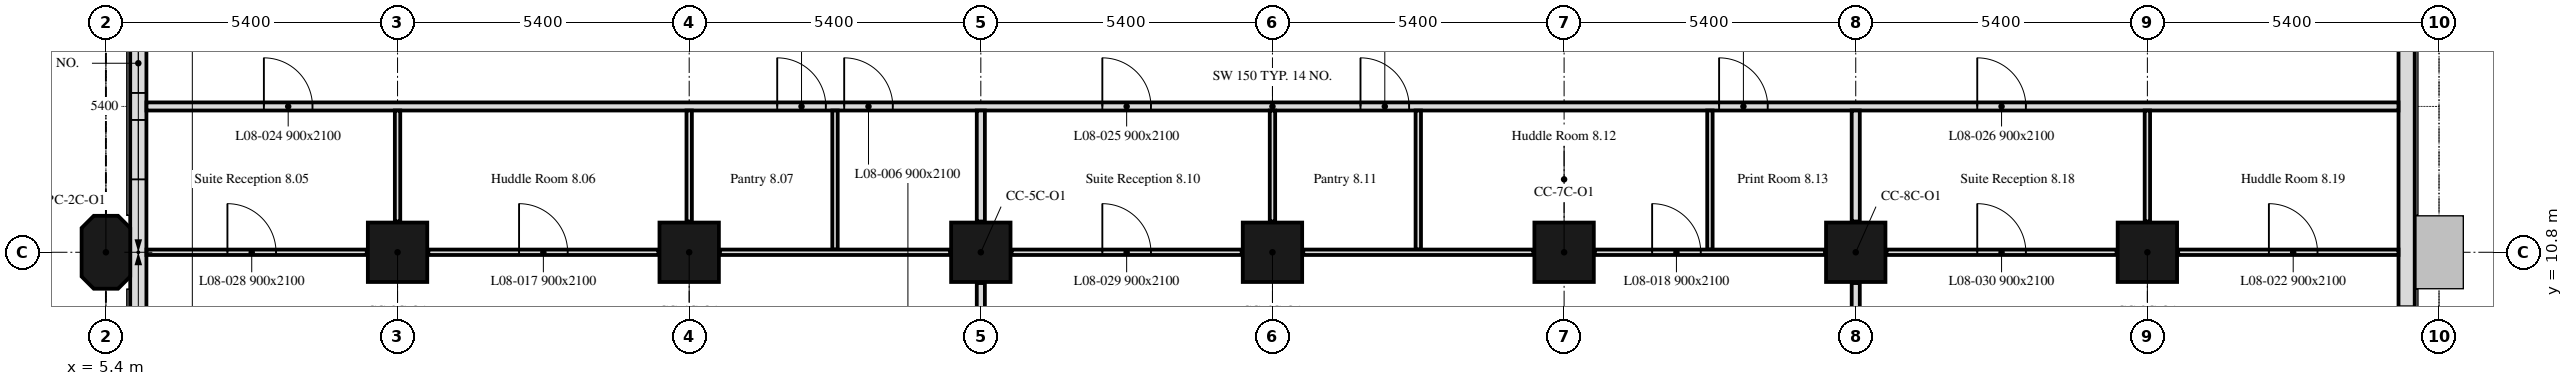
"""IFC4 building model, lengths in metres.
Left out: names, types, materials, properties, quantities, classifications, styles, units other than length and angle.
Written with IfcOpenShell. Run it as: python <this file> out.ifc"""

import sys

from ifc_helpers import new_model, si_unit, direction, frame, frame_2d, origin, origin_2d, place, context, subcontext, project, spatial, polyline, rectangle, outline, extrude, element, fill, save


model = new_model("IFC4")
c1 = context("Model", 3, precision=1e-05, world=origin(), true_north=direction((0.0, 1.0)))
c2 = subcontext(c1, "Body", "Model", "MODEL_VIEW")
j1 = project(units=[si_unit("LENGTHUNIT", "METRE"), si_unit("PLANEANGLEUNIT", "RADIAN")], contexts=[c1])
p1 = place(None, origin())
s1 = spatial("IfcSite", under=j1, at=p1, CompositionType="ELEMENT")
p2 = place(p1, origin())
s2 = spatial("IfcBuilding", under=s1, at=p2, CompositionType="ELEMENT")
p3 = place(p2, frame((0.0, 0.0, 41.2)))
s3 = spatial("IfcBuildingStorey", under=s2, at=p3, CompositionType="ELEMENT", Elevation=41.2)
p4 = place(p3, frame((5.4, 10.8, 0.0), z_axis=(0.0, 0.0, 1.0), x_axis=(0.0, 1.0, 0.0)))
e1 = element("IfcColumn", 1, at=p4, inside=s3, PredefinedType="COLUMN", context=c2, shape_type="SweptSolid", body=[
    extrude(outline(polyline([(-0.45, -0.45), (0.45, -0.45), (0.675, -0.225), (0.675, 0.225), (0.45, 0.45), (-0.45, 0.45), (-0.675, 0.225), (-0.675, -0.225), (-0.45, -0.45)])), origin(), (0.0, 0.0, 1.0), 3.5),
])
for number, where, z_axis, x_axis in (
    (2, (10.8, 10.8, 0.0), (0.0, 0.0, 1.0), (1.0, 0.0, 0.0)),
    (3, (16.2, 10.8, 0.0), (0.0, 0.0, 1.0), (1.0, 0.0, 0.0)),
    (4, (21.6, 10.8, 0.0), (0.0, 0.0, 1.0), (1.0, 0.0, 0.0)),
    (5, (27.0, 10.8, 0.0), (0.0, 0.0, 1.0), (1.0, 0.0, 0.0)),
    (6, (32.4, 10.8, 0.0), (0.0, 0.0, 1.0), (1.0, 0.0, 0.0)),
    (7, (37.8, 10.8, 0.0), (0.0, 0.0, 1.0), (1.0, 0.0, 0.0)),
    (8, (43.2, 10.8, 0.0), (0.0, 0.0, 1.0), (1.0, 0.0, 0.0)),
):
    element("IfcColumn", number, at=place(p3, frame(where, z_axis=z_axis, x_axis=x_axis)), inside=s3, PredefinedType="COLUMN", context=c2, shape_type="SweptSolid", body=[
        extrude(rectangle(XDim=1.1, YDim=1.1, at=origin_2d()), origin(), (0.0, 0.0, 1.0), 3.5),
    ])
p5 = place(p3, frame((48.0, 5.586, 0.0), z_axis=(0.0, 0.0, 1.0), x_axis=(0.0, 1.0, 0.0)))
e9 = element("IfcWall", 9, at=p5, inside=s3, PredefinedType="SOLIDWALL", context=c2, shape_type="SweptSolid", body=[
    extrude(rectangle(XDim=32.027, YDim=0.3, at=frame_2d((16.014, 0.0))), origin(), (0.0, 0.0, 1.0), 3.5),
])
p6 = place(p5, frame((0.814, 0.0, 0.9)))
e10 = element("IfcOpeningElement", 10, at=p6, cuts=e9, PredefinedType="OPENING", context=c2, shape_type="SweptSolid", body=[
    extrude(rectangle(XDim=3.4, YDim=1.7, at=frame_2d((1.7, 0.85))), frame((0.0, 0.16, 0.0), z_axis=(0.0, -1.0, 0.0), x_axis=(1.0, 0.0, 0.0)), (0.0, 0.0, 1.0), 0.32),
])
p7 = place(p5, frame((11.614, 0.0, 0.9)))
e11 = element("IfcOpeningElement", 11, at=p7, cuts=e9, PredefinedType="OPENING", context=c2, shape_type="SweptSolid", body=[
    extrude(rectangle(XDim=3.4, YDim=1.7, at=frame_2d((1.7, 0.85))), frame((0.0, 0.16, 0.0), z_axis=(0.0, -1.0, 0.0), x_axis=(1.0, 0.0, 0.0)), (0.0, 0.0, 1.0), 0.32),
])
p8 = place(p5, frame((22.414, 0.0, 0.9)))
e12 = element("IfcOpeningElement", 12, at=p8, cuts=e9, PredefinedType="OPENING", context=c2, shape_type="SweptSolid", body=[
    extrude(rectangle(XDim=3.4, YDim=1.7, at=frame_2d((1.7, 0.85))), frame((0.0, 0.16, 0.0), z_axis=(0.0, -1.0, 0.0), x_axis=(1.0, 0.0, 0.0)), (0.0, 0.0, 1.0), 0.32),
])
p9 = place(p3, frame((6.0, 16.2, 0.0), z_axis=(0.0, 0.0, 1.0), x_axis=(0.0, -1.0, 0.0)))
e13 = element("IfcWall", 13, at=p9, inside=s3, PredefinedType="SOLIDWALL", context=c2, shape_type="SweptSolid", body=[
    extrude(rectangle(XDim=10.614, YDim=0.3, at=frame_2d((5.307, 0.0))), origin(), (0.0, 0.0, 1.0), 3.5),
])
p10 = place(p9, frame((1.35, 0.0, 0.9)))
e14 = element("IfcOpeningElement", 14, at=p10, cuts=e13, PredefinedType="OPENING", context=c2, shape_type="SweptSolid", body=[
    extrude(rectangle(XDim=1.1, YDim=1.7, at=frame_2d((0.55, 0.85))), frame((0.0, 0.16, 0.0), z_axis=(0.0, -1.0, 0.0), x_axis=(1.0, 0.0, 0.0)), (0.0, 0.0, 1.0), 0.32),
])
p11 = place(p9, frame((2.95, 0.0, 0.9)))
e15 = element("IfcOpeningElement", 15, at=p11, cuts=e13, PredefinedType="OPENING", context=c2, shape_type="SweptSolid", body=[
    extrude(rectangle(XDim=1.1, YDim=1.7, at=frame_2d((0.55, 0.85))), frame((0.0, 0.16, 0.0), z_axis=(0.0, -1.0, 0.0), x_axis=(1.0, 0.0, 0.0)), (0.0, 0.0, 1.0), 0.32),
])
p12 = place(p3, frame((6.151, 13.5, 0.0), z_axis=(0.0, 0.0, 1.0), x_axis=(1.0, 0.0, 0.0)))
e16 = element("IfcWall", 16, at=p12, inside=s3, PredefinedType="PARTITIONING", context=c2, shape_type="SweptSolid", body=[
    extrude(rectangle(XDim=41.698, YDim=0.15, at=frame_2d((20.849, 0.0))), origin(), (0.0, 0.0, 1.0), 2.75),
])
p13 = place(p12, frame((11.679, 0.0, 0.0)))
e17 = element("IfcOpeningElement", 17, at=p13, cuts=e16, PredefinedType="OPENING", context=c2, shape_type="SweptSolid", body=[
    extrude(rectangle(XDim=0.9, YDim=2.1, at=frame_2d((0.45, 1.05))), frame((0.0, 0.075, 0.0), z_axis=(0.0, -1.0, 0.0), x_axis=(1.0, 0.0, 0.0)), (0.0, 0.0, 1.0), 0.15),
])
p14 = place(p12, frame((12.919, 0.0, 0.0)))
e18 = element("IfcOpeningElement", 18, at=p14, cuts=e16, PredefinedType="OPENING", context=c2, shape_type="SweptSolid", body=[
    extrude(rectangle(XDim=0.9, YDim=2.1, at=frame_2d((0.45, 1.05))), frame((0.0, 0.075, 0.0), z_axis=(0.0, -1.0, 0.0), x_axis=(1.0, 0.0, 0.0)), (0.0, 0.0, 1.0), 0.15),
])
p15 = place(p12, frame((22.479, 0.0, 0.0)))
e19 = element("IfcOpeningElement", 19, at=p15, cuts=e16, PredefinedType="OPENING", context=c2, shape_type="SweptSolid", body=[
    extrude(rectangle(XDim=0.9, YDim=2.1, at=frame_2d((0.45, 1.05))), frame((0.0, 0.075, 0.0), z_axis=(0.0, -1.0, 0.0), x_axis=(1.0, 0.0, 0.0)), (0.0, 0.0, 1.0), 0.15),
])
p16 = place(p12, frame((29.119, 0.0, 0.0)))
e20 = element("IfcOpeningElement", 20, at=p16, cuts=e16, PredefinedType="OPENING", context=c2, shape_type="SweptSolid", body=[
    extrude(rectangle(XDim=0.9, YDim=2.1, at=frame_2d((0.45, 1.05))), frame((0.0, 0.075, 0.0), z_axis=(0.0, -1.0, 0.0), x_axis=(1.0, 0.0, 0.0)), (0.0, 0.0, 1.0), 0.15),
])
p17 = place(p12, frame((2.174, 0.0, 0.0)))
e21 = element("IfcOpeningElement", 21, at=p17, cuts=e16, PredefinedType="OPENING", context=c2, shape_type="SweptSolid", body=[
    extrude(rectangle(XDim=0.9, YDim=2.1, at=frame_2d((0.45, 1.05))), frame((0.0, 0.075, 0.0), z_axis=(0.0, -1.0, 0.0), x_axis=(1.0, 0.0, 0.0)), (0.0, 0.0, 1.0), 0.15),
])
p18 = place(p12, frame((17.699, 0.0, 0.0)))
e22 = element("IfcOpeningElement", 22, at=p18, cuts=e16, PredefinedType="OPENING", context=c2, shape_type="SweptSolid", body=[
    extrude(rectangle(XDim=0.9, YDim=2.1, at=frame_2d((0.45, 1.05))), frame((0.0, 0.075, 0.0), z_axis=(0.0, -1.0, 0.0), x_axis=(1.0, 0.0, 0.0)), (0.0, 0.0, 1.0), 0.15),
])
p19 = place(p12, frame((33.899, 0.0, 0.0)))
e23 = element("IfcOpeningElement", 23, at=p19, cuts=e16, PredefinedType="OPENING", context=c2, shape_type="SweptSolid", body=[
    extrude(rectangle(XDim=0.9, YDim=2.1, at=frame_2d((0.45, 1.05))), frame((0.0, 0.075, 0.0), z_axis=(0.0, -1.0, 0.0), x_axis=(1.0, 0.0, 0.0)), (0.0, 0.0, 1.0), 0.15),
])
p20 = place(p3, frame((6.151, 10.8, 0.0), z_axis=(0.0, 0.0, 1.0), x_axis=(1.0, 0.0, 0.0)))
e24 = element("IfcWall", 24, at=p20, inside=s3, PredefinedType="PARTITIONING", context=c2, shape_type="SweptSolid", body=[
    extrude(rectangle(XDim=4.079, YDim=0.1, at=frame_2d((2.04, 0.0))), origin(), (0.0, 0.0, 1.0), 3.5),
])
p21 = place(p20, frame((1.499, 0.0, 0.0)))
e25 = element("IfcOpeningElement", 25, at=p21, cuts=e24, PredefinedType="OPENING", context=c2, shape_type="SweptSolid", body=[
    extrude(rectangle(XDim=0.9, YDim=2.1, at=frame_2d((0.45, 1.05))), frame((0.0, 0.05, 0.0), z_axis=(0.0, -1.0, 0.0), x_axis=(1.0, 0.0, 0.0)), (0.0, 0.0, 1.0), 0.1),
])
p22 = place(p3, frame((10.8, 11.37, 0.0), z_axis=(0.0, 0.0, 1.0), x_axis=(0.0, 1.0, 0.0)))
e26 = element("IfcWall", 26, at=p22, inside=s3, PredefinedType="PARTITIONING", context=c2, shape_type="SweptSolid", body=[
    extrude(rectangle(XDim=2.055, YDim=0.1, at=frame_2d((1.027, 0.0))), origin(), (0.0, 0.0, 1.0), 3.5),
])
p23 = place(p3, frame((11.37, 10.8, 0.0), z_axis=(0.0, 0.0, 1.0), x_axis=(1.0, 0.0, 0.0)))
e27 = element("IfcWall", 27, at=p23, inside=s3, PredefinedType="PARTITIONING", context=c2, shape_type="SweptSolid", body=[
    extrude(rectangle(XDim=4.26, YDim=0.1, at=frame_2d((2.13, 0.0))), origin(), (0.0, 0.0, 1.0), 3.5),
])
p24 = place(p23, frame((1.68, 0.0, 0.0)))
e28 = element("IfcOpeningElement", 28, at=p24, cuts=e27, PredefinedType="OPENING", context=c2, shape_type="SweptSolid", body=[
    extrude(rectangle(XDim=0.9, YDim=2.1, at=frame_2d((0.45, 1.05))), frame((0.0, 0.05, 0.0), z_axis=(0.0, -1.0, 0.0), x_axis=(1.0, 0.0, 0.0)), (0.0, 0.0, 1.0), 0.1),
])
p25 = place(p3, frame((16.2, 11.37, 0.0), z_axis=(0.0, 0.0, 1.0), x_axis=(0.0, 1.0, 0.0)))
e29 = element("IfcWall", 29, at=p25, inside=s3, PredefinedType="PARTITIONING", context=c2, shape_type="SweptSolid", body=[
    extrude(rectangle(XDim=2.055, YDim=0.1, at=frame_2d((1.027, 0.0))), origin(), (0.0, 0.0, 1.0), 2.75),
])
p26 = place(p3, frame((18.9, 10.85, 0.0), z_axis=(0.0, 0.0, 1.0), x_axis=(0.0, 1.0, 0.0)))
e30 = element("IfcWall", 30, at=p26, inside=s3, PredefinedType="PARTITIONING", context=c2, shape_type="SweptSolid", body=[
    extrude(rectangle(XDim=2.575, YDim=0.1, at=frame_2d((1.288, 0.0))), origin(), (0.0, 0.0, 1.0), 3.5),
])
p27 = place(p3, frame((16.77, 10.8, 0.0), z_axis=(0.0, 0.0, 1.0), x_axis=(1.0, 0.0, 0.0)))
e31 = element("IfcWall", 31, at=p27, inside=s3, PredefinedType="PARTITIONING", context=c2, shape_type="SweptSolid", body=[
    extrude(rectangle(XDim=4.26, YDim=0.1, at=frame_2d((2.13, 0.0))), origin(), (0.0, 0.0, 1.0), 3.5),
])
p28 = place(p3, frame((21.6, 11.37, 0.0), z_axis=(0.0, 0.0, 1.0), x_axis=(0.0, 1.0, 0.0)))
e32 = element("IfcWall", 32, at=p28, inside=s3, PredefinedType="PARTITIONING", context=c2, shape_type="SweptSolid", body=[
    extrude(rectangle(XDim=2.055, YDim=0.15, at=frame_2d((1.027, 0.0))), origin(), (0.0, 0.0, 1.0), 2.75),
])
p29 = place(p3, frame((21.6, 5.97, 0.0), z_axis=(0.0, 0.0, 1.0), x_axis=(0.0, 1.0, 0.0)))
e33 = element("IfcWall", 33, at=p29, inside=s3, PredefinedType="PARTITIONING", context=c2, shape_type="SweptSolid", body=[
    extrude(rectangle(XDim=4.26, YDim=0.15, at=frame_2d((2.13, 0.0))), origin(), (0.0, 0.0, 1.0), 2.75),
])
p30 = place(p3, frame((22.17, 10.8, 0.0), z_axis=(0.0, 0.0, 1.0), x_axis=(1.0, 0.0, 0.0)))
e34 = element("IfcWall", 34, at=p30, inside=s3, PredefinedType="PARTITIONING", context=c2, shape_type="SweptSolid", body=[
    extrude(rectangle(XDim=4.26, YDim=0.1, at=frame_2d((2.13, 0.0))), origin(), (0.0, 0.0, 1.0), 3.5),
])
p31 = place(p30, frame((1.68, 0.0, 0.0)))
e35 = element("IfcOpeningElement", 35, at=p31, cuts=e34, PredefinedType="OPENING", context=c2, shape_type="SweptSolid", body=[
    extrude(rectangle(XDim=0.9, YDim=2.1, at=frame_2d((0.45, 1.05))), frame((0.0, 0.05, 0.0), z_axis=(0.0, -1.0, 0.0), x_axis=(1.0, 0.0, 0.0)), (0.0, 0.0, 1.0), 0.1),
])
p32 = place(p3, frame((27.0, 11.37, 0.0), z_axis=(0.0, 0.0, 1.0), x_axis=(0.0, 1.0, 0.0)))
e36 = element("IfcWall", 36, at=p32, inside=s3, PredefinedType="PARTITIONING", context=c2, shape_type="SweptSolid", body=[
    extrude(rectangle(XDim=2.055, YDim=0.1, at=frame_2d((1.027, 0.0))), origin(), (0.0, 0.0, 1.0), 2.75),
])
p33 = place(p3, frame((29.7, 10.85, 0.0), z_axis=(0.0, 0.0, 1.0), x_axis=(0.0, 1.0, 0.0)))
e37 = element("IfcWall", 37, at=p33, inside=s3, PredefinedType="PARTITIONING", context=c2, shape_type="SweptSolid", body=[
    extrude(rectangle(XDim=2.575, YDim=0.1, at=frame_2d((1.288, 0.0))), origin(), (0.0, 0.0, 1.0), 3.5),
])
p34 = place(p3, frame((27.57, 10.8, 0.0), z_axis=(0.0, 0.0, 1.0), x_axis=(1.0, 0.0, 0.0)))
e38 = element("IfcWall", 38, at=p34, inside=s3, PredefinedType="PARTITIONING", context=c2, shape_type="SweptSolid", body=[
    extrude(rectangle(XDim=4.26, YDim=0.1, at=frame_2d((2.13, 0.0))), origin(), (0.0, 0.0, 1.0), 3.5),
])
p35 = place(p3, frame((35.1, 10.85, 0.0), z_axis=(0.0, 0.0, 1.0), x_axis=(0.0, 1.0, 0.0)))
e39 = element("IfcWall", 39, at=p35, inside=s3, PredefinedType="PARTITIONING", context=c2, shape_type="SweptSolid", body=[
    extrude(rectangle(XDim=2.575, YDim=0.1, at=frame_2d((1.288, 0.0))), origin(), (0.0, 0.0, 1.0), 3.5),
])
p36 = place(p3, frame((32.97, 10.8, 0.0), z_axis=(0.0, 0.0, 1.0), x_axis=(1.0, 0.0, 0.0)))
e40 = element("IfcWall", 40, at=p36, inside=s3, PredefinedType="PARTITIONING", context=c2, shape_type="SweptSolid", body=[
    extrude(rectangle(XDim=4.26, YDim=0.1, at=frame_2d((2.13, 0.0))), origin(), (0.0, 0.0, 1.0), 2.75),
])
p37 = place(p36, frame((1.06, 0.0, 0.0)))
e41 = element("IfcOpeningElement", 41, at=p37, cuts=e40, PredefinedType="OPENING", context=c2, shape_type="SweptSolid", body=[
    extrude(rectangle(XDim=0.9, YDim=2.1, at=frame_2d((0.45, 1.05))), frame((0.0, 0.05, 0.0), z_axis=(0.0, -1.0, 0.0), x_axis=(1.0, 0.0, 0.0)), (0.0, 0.0, 1.0), 0.1),
])
p38 = place(p3, frame((37.8, 11.37, 0.0), z_axis=(0.0, 0.0, 1.0), x_axis=(0.0, 1.0, 0.0)))
e42 = element("IfcWall", 42, at=p38, inside=s3, PredefinedType="PARTITIONING", context=c2, shape_type="SweptSolid", body=[
    extrude(rectangle(XDim=2.055, YDim=0.15, at=frame_2d((1.027, 0.0))), origin(), (0.0, 0.0, 1.0), 2.75),
])
p39 = place(p3, frame((37.8, 5.97, 0.0), z_axis=(0.0, 0.0, 1.0), x_axis=(0.0, 1.0, 0.0)))
e43 = element("IfcWall", 43, at=p39, inside=s3, PredefinedType="PARTITIONING", context=c2, shape_type="SweptSolid", body=[
    extrude(rectangle(XDim=4.26, YDim=0.15, at=frame_2d((2.13, 0.0))), origin(), (0.0, 0.0, 1.0), 2.75),
])
p40 = place(p3, frame((38.37, 10.8, 0.0), z_axis=(0.0, 0.0, 1.0), x_axis=(1.0, 0.0, 0.0)))
e44 = element("IfcWall", 44, at=p40, inside=s3, PredefinedType="PARTITIONING", context=c2, shape_type="SweptSolid", body=[
    extrude(rectangle(XDim=4.26, YDim=0.1, at=frame_2d((2.13, 0.0))), origin(), (0.0, 0.0, 1.0), 2.75),
])
p41 = place(p40, frame((1.68, 0.0, 0.0)))
e45 = element("IfcOpeningElement", 45, at=p41, cuts=e44, PredefinedType="OPENING", context=c2, shape_type="SweptSolid", body=[
    extrude(rectangle(XDim=0.9, YDim=2.1, at=frame_2d((0.45, 1.05))), frame((0.0, 0.05, 0.0), z_axis=(0.0, -1.0, 0.0), x_axis=(1.0, 0.0, 0.0)), (0.0, 0.0, 1.0), 0.1),
])
p42 = place(p3, frame((43.2, 11.37, 0.0), z_axis=(0.0, 0.0, 1.0), x_axis=(0.0, 1.0, 0.0)))
e46 = element("IfcWall", 46, at=p42, inside=s3, PredefinedType="PARTITIONING", context=c2, shape_type="SweptSolid", body=[
    extrude(rectangle(XDim=2.055, YDim=0.1, at=frame_2d((1.027, 0.0))), origin(), (0.0, 0.0, 1.0), 3.5),
])
p43 = place(p3, frame((43.77, 10.8, 0.0), z_axis=(0.0, 0.0, 1.0), x_axis=(1.0, 0.0, 0.0)))
e47 = element("IfcWall", 47, at=p43, inside=s3, PredefinedType="PARTITIONING", context=c2, shape_type="SweptSolid", body=[
    extrude(rectangle(XDim=4.079, YDim=0.1, at=frame_2d((2.04, 0.0))), origin(), (0.0, 0.0, 1.0), 2.75),
])
p44 = place(p43, frame((1.68, 0.0, 0.0)))
e48 = element("IfcOpeningElement", 48, at=p44, cuts=e47, PredefinedType="OPENING", context=c2, shape_type="SweptSolid", body=[
    extrude(rectangle(XDim=0.9, YDim=2.1, at=frame_2d((0.45, 1.05))), frame((0.0, 0.05, 0.0), z_axis=(0.0, -1.0, 0.0), x_axis=(1.0, 0.0, 0.0)), (0.0, 0.0, 1.0), 0.1),
])
p45 = place(p10, origin())
e49 = element("IfcWindow", 49, at=p45, inside=s3, PartitioningType="SINGLE_PANEL", PredefinedType="WINDOW", context=c2, shape_type="SweptSolid", body=[
    extrude(rectangle(XDim=1.1, YDim=1.7, at=frame_2d((0.55, 0.85))), frame((0.0, 0.03, 0.0), z_axis=(0.0, -1.0, 0.0), x_axis=(1.0, 0.0, 0.0)), (0.0, 0.0, 1.0), 0.06),
])
fill(e14, e49)
p46 = place(p11, origin())
e50 = element("IfcWindow", 50, at=p46, inside=s3, PartitioningType="SINGLE_PANEL", PredefinedType="WINDOW", context=c2, shape_type="SweptSolid", body=[
    extrude(rectangle(XDim=1.1, YDim=1.7, at=frame_2d((0.55, 0.85))), frame((0.0, 0.03, 0.0), z_axis=(0.0, -1.0, 0.0), x_axis=(1.0, 0.0, 0.0)), (0.0, 0.0, 1.0), 0.06),
])
fill(e15, e50)
p47 = place(p13, origin())
e51 = element("IfcDoor", 51, at=p47, inside=s3, OperationType="SINGLE_SWING_RIGHT", PredefinedType="DOOR", context=c2, shape_type="SweptSolid", body=[
    extrude(rectangle(XDim=0.9, YDim=2.1, at=frame_2d((0.45, 1.05))), frame((0.0, 0.025, 0.0), z_axis=(0.0, -1.0, 0.0), x_axis=(1.0, 0.0, 0.0)), (0.0, 0.0, 1.0), 0.05),
])
fill(e17, e51)
p48 = place(p14, origin())
e52 = element("IfcDoor", 52, at=p48, inside=s3, OperationType="SINGLE_SWING_RIGHT", PredefinedType="DOOR", context=c2, shape_type="SweptSolid", body=[
    extrude(rectangle(XDim=0.9, YDim=2.1, at=frame_2d((0.45, 1.05))), frame((0.0, 0.025, 0.0), z_axis=(0.0, -1.0, 0.0), x_axis=(1.0, 0.0, 0.0)), (0.0, 0.0, 1.0), 0.05),
])
fill(e18, e52)
p49 = place(p15, origin())
e53 = element("IfcDoor", 53, at=p49, inside=s3, OperationType="SINGLE_SWING_RIGHT", PredefinedType="DOOR", context=c2, shape_type="SweptSolid", body=[
    extrude(rectangle(XDim=0.9, YDim=2.1, at=frame_2d((0.45, 1.05))), frame((0.0, 0.025, 0.0), z_axis=(0.0, -1.0, 0.0), x_axis=(1.0, 0.0, 0.0)), (0.0, 0.0, 1.0), 0.05),
])
fill(e19, e53)
p50 = place(p16, origin())
e54 = element("IfcDoor", 54, at=p50, inside=s3, OperationType="SINGLE_SWING_RIGHT", PredefinedType="DOOR", context=c2, shape_type="SweptSolid", body=[
    extrude(rectangle(XDim=0.9, YDim=2.1, at=frame_2d((0.45, 1.05))), frame((0.0, 0.025, 0.0), z_axis=(0.0, -1.0, 0.0), x_axis=(1.0, 0.0, 0.0)), (0.0, 0.0, 1.0), 0.05),
])
fill(e20, e54)
p51 = place(p24, origin())
e55 = element("IfcDoor", 55, at=p51, inside=s3, OperationType="SINGLE_SWING_LEFT", PredefinedType="DOOR", context=c2, shape_type="SweptSolid", body=[
    extrude(rectangle(XDim=0.9, YDim=2.1, at=frame_2d((0.45, 1.05))), frame((0.0, 0.025, 0.0), z_axis=(0.0, -1.0, 0.0), x_axis=(1.0, 0.0, 0.0)), (0.0, 0.0, 1.0), 0.05),
])
fill(e28, e55)
p52 = place(p37, origin())
e56 = element("IfcDoor", 56, at=p52, inside=s3, OperationType="SINGLE_SWING_LEFT", PredefinedType="DOOR", context=c2, shape_type="SweptSolid", body=[
    extrude(rectangle(XDim=0.9, YDim=2.1, at=frame_2d((0.45, 1.05))), frame((0.0, 0.025, 0.0), z_axis=(0.0, -1.0, 0.0), x_axis=(1.0, 0.0, 0.0)), (0.0, 0.0, 1.0), 0.05),
])
fill(e41, e56)
p53 = place(p44, origin())
e57 = element("IfcDoor", 57, at=p53, inside=s3, OperationType="SINGLE_SWING_RIGHT", PredefinedType="DOOR", context=c2, shape_type="SweptSolid", body=[
    extrude(rectangle(XDim=0.9, YDim=2.1, at=frame_2d((0.45, 1.05))), frame((0.0, 0.025, 0.0), z_axis=(0.0, -1.0, 0.0), x_axis=(1.0, 0.0, 0.0)), (0.0, 0.0, 1.0), 0.05),
])
fill(e48, e57)
p54 = place(p17, origin())
e58 = element("IfcDoor", 58, at=p54, inside=s3, OperationType="SINGLE_SWING_RIGHT", PredefinedType="DOOR", context=c2, shape_type="SweptSolid", body=[
    extrude(rectangle(XDim=0.9, YDim=2.1, at=frame_2d((0.45, 1.05))), frame((0.0, 0.025, 0.0), z_axis=(0.0, -1.0, 0.0), x_axis=(1.0, 0.0, 0.0)), (0.0, 0.0, 1.0), 0.05),
])
fill(e21, e58)
p55 = place(p18, origin())
e59 = element("IfcDoor", 59, at=p55, inside=s3, OperationType="SINGLE_SWING_RIGHT", PredefinedType="DOOR", context=c2, shape_type="SweptSolid", body=[
    extrude(rectangle(XDim=0.9, YDim=2.1, at=frame_2d((0.45, 1.05))), frame((0.0, 0.025, 0.0), z_axis=(0.0, -1.0, 0.0), x_axis=(1.0, 0.0, 0.0)), (0.0, 0.0, 1.0), 0.05),
])
fill(e22, e59)
p56 = place(p19, origin())
e60 = element("IfcDoor", 60, at=p56, inside=s3, OperationType="SINGLE_SWING_RIGHT", PredefinedType="DOOR", context=c2, shape_type="SweptSolid", body=[
    extrude(rectangle(XDim=0.9, YDim=2.1, at=frame_2d((0.45, 1.05))), frame((0.0, 0.025, 0.0), z_axis=(0.0, -1.0, 0.0), x_axis=(1.0, 0.0, 0.0)), (0.0, 0.0, 1.0), 0.05),
])
fill(e23, e60)
p57 = place(p21, origin())
e61 = element("IfcDoor", 61, at=p57, inside=s3, OperationType="SINGLE_SWING_RIGHT", PredefinedType="DOOR", context=c2, shape_type="SweptSolid", body=[
    extrude(rectangle(XDim=0.9, YDim=2.1, at=frame_2d((0.45, 1.05))), frame((0.0, 0.025, 0.0), z_axis=(0.0, -1.0, 0.0), x_axis=(1.0, 0.0, 0.0)), (0.0, 0.0, 1.0), 0.05),
])
fill(e25, e61)
p58 = place(p31, origin())
e62 = element("IfcDoor", 62, at=p58, inside=s3, OperationType="SINGLE_SWING_RIGHT", PredefinedType="DOOR", context=c2, shape_type="SweptSolid", body=[
    extrude(rectangle(XDim=0.9, YDim=2.1, at=frame_2d((0.45, 1.05))), frame((0.0, 0.025, 0.0), z_axis=(0.0, -1.0, 0.0), x_axis=(1.0, 0.0, 0.0)), (0.0, 0.0, 1.0), 0.05),
])
fill(e35, e62)
p59 = place(p41, origin())
e63 = element("IfcDoor", 63, at=p59, inside=s3, OperationType="SINGLE_SWING_LEFT", PredefinedType="DOOR", context=c2, shape_type="SweptSolid", body=[
    extrude(rectangle(XDim=0.9, YDim=2.1, at=frame_2d((0.45, 1.05))), frame((0.0, 0.025, 0.0), z_axis=(0.0, -1.0, 0.0), x_axis=(1.0, 0.0, 0.0)), (0.0, 0.0, 1.0), 0.05),
])
fill(e45, e63)
save(model, sys.argv[1])
